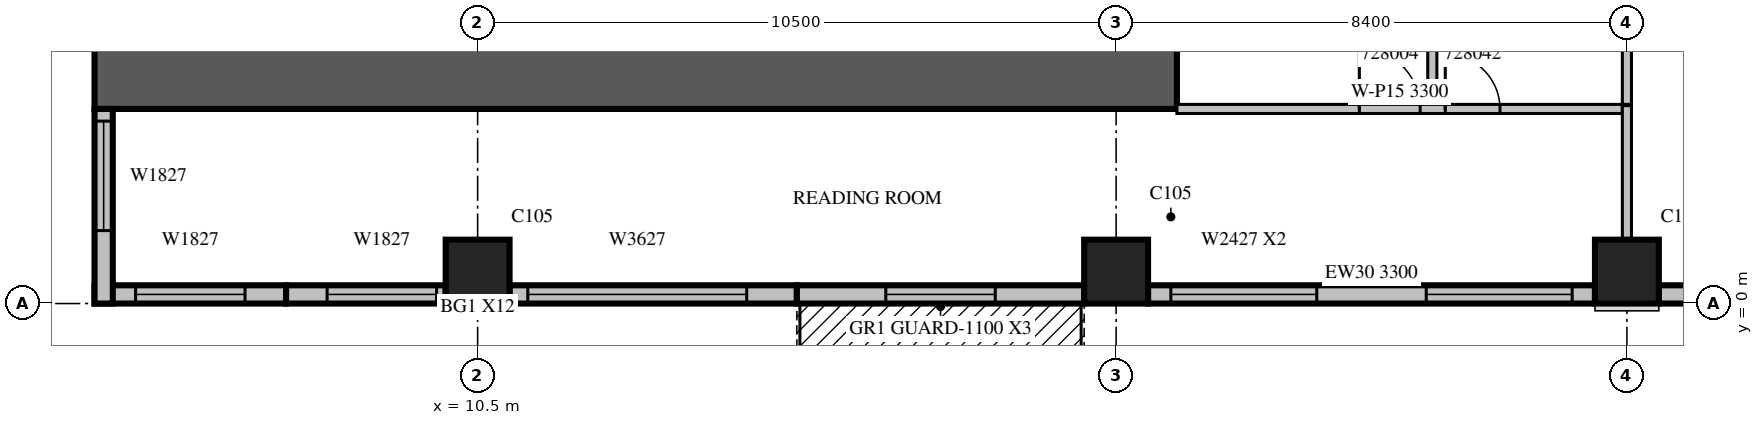
"""IFC4 building model, lengths in metres.
Left out: names, types, materials, properties, quantities, classifications, styles, units other than length and angle.
Written with IfcOpenShell. Run it as: python <this file> out.ifc"""

import sys

from ifc_helpers import new_model, si_unit, direction, frame, frame_2d, origin, origin_2d, place, context, subcontext, project, spatial, rectangle, extrude, source, transform, mapped, element, fill, save


model = new_model("IFC4")
c1 = context("Model", 3, precision=1e-05, world=origin(), true_north=direction((0.0, 1.0)))
c2 = subcontext(c1, "Body", "Model", "MODEL_VIEW")
j1 = project(units=[si_unit("LENGTHUNIT", "METRE"), si_unit("PLANEANGLEUNIT", "RADIAN")], contexts=[c1])
p1 = place(None, origin())
s1 = spatial("IfcSite", under=j1, at=p1, CompositionType="ELEMENT")
p2 = place(p1, origin())
s2 = spatial("IfcBuilding", under=s1, at=p2, CompositionType="ELEMENT")
p3 = place(p2, frame((0.0, 0.0, 128.7)))
s3 = spatial("IfcBuildingStorey", under=s2, at=p3, CompositionType="ELEMENT", Elevation=128.7)
m1 = source(origin(), c2, "Body", "SweptSolid", [
    extrude(rectangle(XDim=1.05, YDim=1.05, at=origin_2d()), origin(), (0.0, 0.0, 1.0), 4.2),
])
for number, where, z_axis, x_axis in (
    (1, (10.5, 0.525, 0.0), (0.0, 0.0, 1.0), (1.0, 0.0, 0.0)),
    (2, (21.0, 0.525, 0.0), (0.0, 0.0, 1.0), (1.0, 0.0, 0.0)),
    (3, (29.4, 0.525, 0.0), (0.0, 0.0, 1.0), (1.0, 0.0, 0.0)),
):
    element("IfcColumn", number, at=place(p3, frame(where, z_axis=z_axis, x_axis=x_axis)), inside=s3, PredefinedType="COLUMN", context=c2, shape_type="MappedRepresentation", body=[
        mapped(m1, transform((0.0, 0.0, 0.0), scale=1.0)),
    ])
m2 = source(origin(), c2, "Body", "SweptSolid", [
    extrude(rectangle(XDim=17.8, YDim=1.0, at=frame_2d((8.9, 0.0))), origin(), (0.0, 0.0, 1.0), 4.2),
])
p4 = place(p3, frame((4.2, 3.7, 0.0), z_axis=(0.0, 0.0, 1.0), x_axis=(1.0, 0.0, 0.0)))
e4 = element("IfcWall", 4, at=p4, inside=s3, PredefinedType="SHEAR", context=c2, shape_type="MappedRepresentation", body=[
    mapped(m2, transform((0.0, 0.0, 0.0), scale=1.0)),
])
m3 = source(origin(), c2, "Body", "SweptSolid", [
    extrude(rectangle(XDim=3.15, YDim=0.3, at=frame_2d((1.575, 0.0))), origin(), (0.0, 0.0, 1.0), 3.8),
])
p5 = place(p3, frame((4.2, 0.15, 0.0), z_axis=(0.0, 0.0, 1.0), x_axis=(1.0, 0.0, 0.0)))
e5 = element("IfcWall", 5, at=p5, inside=s3, PredefinedType="STANDARD", context=c2, shape_type="MappedRepresentation", body=[
    mapped(m3, transform((0.0, 0.0, 0.0), scale=1.0)),
])
m4 = source(origin(), c2, "Body", "SweptSolid", [
    extrude(rectangle(XDim=1.8, YDim=2.7, at=frame_2d((0.9, 1.35))), frame((0.0, 0.16, 0.0), z_axis=(0.0, -1.0, 0.0), x_axis=(1.0, 0.0, 0.0)), (0.0, 0.0, 1.0), 0.32),
])
p6 = place(p5, frame((0.675, 0.0, 0.6)))
e6 = element("IfcOpeningElement", 6, at=p6, cuts=e5, PredefinedType="OPENING", context=c2, shape_type="MappedRepresentation", body=[
    mapped(m4, transform((0.0, 0.0, 0.0), scale=1.0)),
])
m5 = source(origin(), c2, "Body", "SweptSolid", [
    extrude(rectangle(XDim=2.625, YDim=0.3, at=frame_2d((1.312, 0.0))), origin(), (0.0, 0.0, 1.0), 3.8),
])
p7 = place(p3, frame((7.35, 0.15, 0.0), z_axis=(0.0, 0.0, 1.0), x_axis=(1.0, 0.0, 0.0)))
e7 = element("IfcWall", 7, at=p7, inside=s3, PredefinedType="STANDARD", context=c2, shape_type="MappedRepresentation", body=[
    mapped(m5, transform((0.0, 0.0, 0.0), scale=1.0)),
])
p8 = place(p7, frame((0.675, 0.0, 0.6)))
e8 = element("IfcOpeningElement", 8, at=p8, cuts=e7, PredefinedType="OPENING", context=c2, shape_type="MappedRepresentation", body=[
    mapped(m4, transform((0.0, 0.0, 0.0), scale=1.0)),
])
m6 = source(origin(), c2, "Body", "SweptSolid", [
    extrude(rectangle(XDim=4.725, YDim=0.3, at=frame_2d((2.362, 0.0))), origin(), (0.0, 0.0, 1.0), 3.8),
])
p9 = place(p3, frame((11.025, 0.15, 0.0), z_axis=(0.0, 0.0, 1.0), x_axis=(1.0, 0.0, 0.0)))
e9 = element("IfcWall", 9, at=p9, inside=s3, PredefinedType="STANDARD", context=c2, shape_type="MappedRepresentation", body=[
    mapped(m6, transform((0.0, 0.0, 0.0), scale=1.0)),
])
m7 = source(origin(), c2, "Body", "SweptSolid", [
    extrude(rectangle(XDim=3.6, YDim=2.7, at=frame_2d((1.8, 1.35))), frame((0.0, 0.16, 0.0), z_axis=(0.0, -1.0, 0.0), x_axis=(1.0, 0.0, 0.0)), (0.0, 0.0, 1.0), 0.32),
])
p10 = place(p9, frame((0.3, 0.0, 0.6)))
e10 = element("IfcOpeningElement", 10, at=p10, cuts=e9, PredefinedType="OPENING", context=c2, shape_type="MappedRepresentation", body=[
    mapped(m7, transform((0.0, 0.0, 0.0), scale=1.0)),
])
p11 = place(p3, frame((15.75, 0.15, 0.0), z_axis=(0.0, 0.0, 1.0), x_axis=(1.0, 0.0, 0.0)))
e11 = element("IfcWall", 11, at=p11, inside=s3, PredefinedType="STANDARD", context=c2, shape_type="MappedRepresentation", body=[
    mapped(m6, transform((0.0, 0.0, 0.0), scale=1.0)),
])
m8 = source(origin(), c2, "Body", "SweptSolid", [
    extrude(rectangle(XDim=1.8, YDim=2.4, at=frame_2d((0.9, 1.2))), frame((0.0, 0.16, 0.0), z_axis=(0.0, -1.0, 0.0), x_axis=(1.0, 0.0, 0.0)), (0.0, 0.0, 1.0), 0.32),
])
p12 = place(p11, frame((1.462, 0.0, 0.0)))
e12 = element("IfcOpeningElement", 12, at=p12, cuts=e11, PredefinedType="OPENING", context=c2, shape_type="MappedRepresentation", body=[
    mapped(m8, transform((0.0, 0.0, 0.0), scale=1.0)),
])
m9 = source(origin(), c2, "Body", "SweptSolid", [
    extrude(rectangle(XDim=7.35, YDim=0.3, at=frame_2d((3.675, 0.0))), origin(), (0.0, 0.0, 1.0), 3.3),
])
p13 = place(p3, frame((21.525, 0.15, 0.0), z_axis=(0.0, 0.0, 1.0), x_axis=(1.0, 0.0, 0.0)))
e13 = element("IfcWall", 13, at=p13, inside=s3, PredefinedType="STANDARD", context=c2, shape_type="MappedRepresentation", body=[
    mapped(m9, transform((0.0, 0.0, 0.0), scale=1.0)),
])
m10 = source(origin(), c2, "Body", "SweptSolid", [
    extrude(rectangle(XDim=2.4, YDim=2.7, at=frame_2d((1.2, 1.35))), frame((0.0, 0.16, 0.0), z_axis=(0.0, -1.0, 0.0), x_axis=(1.0, 0.0, 0.0)), (0.0, 0.0, 1.0), 0.32),
])
p14 = place(p13, frame((0.375, 0.0, 0.6)))
e14 = element("IfcOpeningElement", 14, at=p14, cuts=e13, PredefinedType="OPENING", context=c2, shape_type="MappedRepresentation", body=[
    mapped(m10, transform((0.0, 0.0, 0.0), scale=1.0)),
])
p15 = place(p13, frame((4.575, 0.0, 0.6)))
e15 = element("IfcOpeningElement", 15, at=p15, cuts=e13, PredefinedType="OPENING", context=c2, shape_type="MappedRepresentation", body=[
    mapped(m10, transform((0.0, 0.0, 0.0), scale=1.0)),
])
m11 = source(origin(), c2, "Body", "SweptSolid", [
    extrude(rectangle(XDim=7.35, YDim=0.3, at=frame_2d((3.675, 0.0))), origin(), (0.0, 0.0, 1.0), 3.8),
])
p16 = place(p3, frame((29.925, 0.15, 0.0), z_axis=(0.0, 0.0, 1.0), x_axis=(1.0, 0.0, 0.0)))
e16 = element("IfcWall", 16, at=p16, inside=s3, PredefinedType="STANDARD", context=c2, shape_type="MappedRepresentation", body=[
    mapped(m11, transform((0.0, 0.0, 0.0), scale=1.0)),
])
p17 = place(p16, frame((2.575, 0.0, 0.6)))
e17 = element("IfcOpeningElement", 17, at=p17, cuts=e16, PredefinedType="OPENING", context=c2, shape_type="MappedRepresentation", body=[
    mapped(m10, transform((0.0, 0.0, 0.0), scale=1.0)),
])
m12 = source(origin(), c2, "Body", "SweptSolid", [
    extrude(rectangle(XDim=3.2, YDim=0.3, at=frame_2d((1.6, 0.0))), origin(), (0.0, 0.0, 1.0), 3.8),
])
p18 = place(p3, frame((4.35, 3.2, 0.0), z_axis=(0.0, 0.0, 1.0), x_axis=(0.0, -1.0, 0.0)))
e18 = element("IfcWall", 18, at=p18, inside=s3, PredefinedType="STANDARD", context=c2, shape_type="MappedRepresentation", body=[
    mapped(m12, transform((0.0, 0.0, 0.0), scale=1.0)),
])
p19 = place(p18, frame((0.2, 0.0, 0.6)))
e19 = element("IfcOpeningElement", 19, at=p19, cuts=e18, PredefinedType="OPENING", context=c2, shape_type="MappedRepresentation", body=[
    mapped(m4, transform((0.0, 0.0, 0.0), scale=1.0)),
])
p20 = place(p3, frame((26.2, 15.0, 0.0), z_axis=(0.0, 0.0, 1.0), x_axis=(0.0, -1.0, 0.0)))
e20 = element("IfcWall", 20, at=p20, inside=s3, PredefinedType="PARTITIONING", context=c2, shape_type="SweptSolid", body=[
    extrude(rectangle(XDim=11.725, YDim=0.15, at=frame_2d((5.862, 0.0))), origin(), (0.0, 0.0, 1.0), 2.8),
])
m13 = source(origin(), c2, "Body", "SweptSolid", [
    extrude(rectangle(XDim=0.9, YDim=2.1, at=frame_2d((0.45, 1.05))), frame((0.0, 0.085, 0.0), z_axis=(0.0, -1.0, 0.0), x_axis=(1.0, 0.0, 0.0)), (0.0, 0.0, 1.0), 0.17),
])
p21 = place(p20, frame((9.463, 0.0, 0.0)))
e21 = element("IfcOpeningElement", 21, at=p21, cuts=e20, PredefinedType="OPENING", context=c2, shape_type="MappedRepresentation", body=[
    mapped(m13, transform((0.0, 0.0, 0.0), scale=1.0)),
])
p22 = place(p20, frame((2.725, 0.0, 0.0)))
e22 = element("IfcOpeningElement", 22, at=p22, cuts=e20, PredefinedType="OPENING", context=c2, shape_type="MappedRepresentation", body=[
    mapped(m13, transform((0.0, 0.0, 0.0), scale=1.0)),
])
m14 = source(origin(), c2, "Body", "SweptSolid", [
    extrude(rectangle(XDim=6.701, YDim=0.15, at=frame_2d((3.35, 0.0))), origin(), (0.0, 0.0, 1.0), 3.8),
])
p23 = place(p3, frame((29.4, 3.275, 0.0), z_axis=(0.0, 0.0, 1.0), x_axis=(0.0, 1.0, 0.0)))
e23 = element("IfcWall", 23, at=p23, inside=s3, PredefinedType="PARTITIONING", context=c2, shape_type="MappedRepresentation", body=[
    mapped(m14, transform((0.0, 0.0, 0.0), scale=1.0)),
])
m15 = source(origin(), c2, "Body", "SweptSolid", [
    extrude(rectangle(XDim=7.325, YDim=0.15, at=frame_2d((3.663, 0.0))), origin(), (0.0, 0.0, 1.0), 3.3),
])
p24 = place(p3, frame((22.0, 3.2, 0.0), z_axis=(0.0, 0.0, 1.0), x_axis=(1.0, 0.0, 0.0)))
e24 = element("IfcWall", 24, at=p24, inside=s3, PredefinedType="PARTITIONING", context=c2, shape_type="MappedRepresentation", body=[
    mapped(m15, transform((0.0, 0.0, 0.0), scale=1.0)),
])
m16 = source(origin(), c2, "Body", "SweptSolid", [
    extrude(rectangle(XDim=1.0, YDim=2.1, at=frame_2d((0.5, 1.05))), frame((0.0, 0.085, 0.0), z_axis=(0.0, -1.0, 0.0), x_axis=(1.0, 0.0, 0.0)), (0.0, 0.0, 1.0), 0.17),
])
p25 = place(p24, frame((3.0, 0.0, 0.0)))
e25 = element("IfcOpeningElement", 25, at=p25, cuts=e24, PredefinedType="OPENING", context=c2, shape_type="MappedRepresentation", body=[
    mapped(m16, transform((0.0, 0.0, 0.0), scale=1.0)),
])
p26 = place(p24, frame((4.413, 0.0, 0.0)))
e26 = element("IfcOpeningElement", 26, at=p26, cuts=e24, PredefinedType="OPENING", context=c2, shape_type="MappedRepresentation", body=[
    mapped(m13, transform((0.0, 0.0, 0.0), scale=1.0)),
])
m17 = source(origin(), c2, "Body", "SweptSolid", [
    extrude(rectangle(XDim=2.206, YDim=0.15, at=frame_2d((1.103, 0.0))), origin(), (0.0, 0.0, 1.0), 3.8),
])
p27 = place(p3, frame((29.4, 1.049, 0.0), z_axis=(0.0, 0.0, 1.0), x_axis=(0.0, 1.0, 0.0)))
e27 = element("IfcWall", 27, at=p27, inside=s3, PredefinedType="PARTITIONING", context=c2, shape_type="MappedRepresentation", body=[
    mapped(m17, transform((0.0, 0.0, 0.0), scale=1.0)),
])
m18 = source(origin(), c2, "Body", "SweptSolid", [
    extrude(rectangle(XDim=1.8, YDim=2.7, at=frame_2d((0.9, 1.35))), frame((0.0, 0.03, 0.0), z_axis=(0.0, -1.0, 0.0), x_axis=(1.0, 0.0, 0.0)), (0.0, 0.0, 1.0), 0.06),
])
p28 = place(p6, origin())
e28 = element("IfcWindow", 28, at=p28, inside=s3, PartitioningType="SINGLE_PANEL", PredefinedType="WINDOW", context=c2, shape_type="MappedRepresentation", body=[
    mapped(m18, transform((0.0, 0.0, 0.0), scale=1.0)),
])
fill(e6, e28)
p29 = place(p8, origin())
e29 = element("IfcWindow", 29, at=p29, inside=s3, PartitioningType="SINGLE_PANEL", PredefinedType="WINDOW", context=c2, shape_type="MappedRepresentation", body=[
    mapped(m18, transform((0.0, 0.0, 0.0), scale=1.0)),
])
fill(e8, e29)
m19 = source(origin(), c2, "Body", "SweptSolid", [
    extrude(rectangle(XDim=3.6, YDim=2.7, at=frame_2d((1.8, 1.35))), frame((0.0, 0.03, 0.0), z_axis=(0.0, -1.0, 0.0), x_axis=(1.0, 0.0, 0.0)), (0.0, 0.0, 1.0), 0.06),
])
p30 = place(p10, origin())
e30 = element("IfcWindow", 30, at=p30, inside=s3, PartitioningType="SINGLE_PANEL", PredefinedType="WINDOW", context=c2, shape_type="MappedRepresentation", body=[
    mapped(m19, transform((0.0, 0.0, 0.0), scale=1.0)),
])
fill(e10, e30)
m20 = source(origin(), c2, "Body", "SweptSolid", [
    extrude(rectangle(XDim=1.8, YDim=2.4, at=frame_2d((0.9, 1.2))), frame((0.0, 0.025, 0.0), z_axis=(0.0, -1.0, 0.0), x_axis=(1.0, 0.0, 0.0)), (0.0, 0.0, 1.0), 0.05),
])
p31 = place(p12, origin())
e31 = element("IfcDoor", 31, at=p31, inside=s3, OperationType="SLIDING_TO_LEFT", PredefinedType="DOOR", context=c2, shape_type="MappedRepresentation", body=[
    mapped(m20, transform((0.0, 0.0, 0.0), scale=1.0)),
])
fill(e12, e31)
m21 = source(origin(), c2, "Body", "SweptSolid", [
    extrude(rectangle(XDim=2.4, YDim=2.7, at=frame_2d((1.2, 1.35))), frame((0.0, 0.03, 0.0), z_axis=(0.0, -1.0, 0.0), x_axis=(1.0, 0.0, 0.0)), (0.0, 0.0, 1.0), 0.06),
])
p32 = place(p14, origin())
e32 = element("IfcWindow", 32, at=p32, inside=s3, PartitioningType="SINGLE_PANEL", PredefinedType="WINDOW", context=c2, shape_type="MappedRepresentation", body=[
    mapped(m21, transform((0.0, 0.0, 0.0), scale=1.0)),
])
fill(e14, e32)
p33 = place(p15, origin())
e33 = element("IfcWindow", 33, at=p33, inside=s3, PartitioningType="SINGLE_PANEL", PredefinedType="WINDOW", context=c2, shape_type="MappedRepresentation", body=[
    mapped(m21, transform((0.0, 0.0, 0.0), scale=1.0)),
])
fill(e15, e33)
p34 = place(p19, origin())
e34 = element("IfcWindow", 34, at=p34, inside=s3, PartitioningType="SINGLE_PANEL", PredefinedType="WINDOW", context=c2, shape_type="MappedRepresentation", body=[
    mapped(m18, transform((0.0, 0.0, 0.0), scale=1.0)),
])
fill(e19, e34)
m22 = source(origin(), c2, "Body", "SweptSolid", [
    extrude(rectangle(XDim=1.0, YDim=2.1, at=frame_2d((0.5, 1.05))), frame((0.0, 0.025, 0.0), z_axis=(0.0, -1.0, 0.0), x_axis=(1.0, 0.0, 0.0)), (0.0, 0.0, 1.0), 0.05),
])
p35 = place(p25, origin())
e35 = element("IfcDoor", 35, at=p35, inside=s3, OperationType="SINGLE_SWING_LEFT", PredefinedType="DOOR", context=c2, shape_type="MappedRepresentation", body=[
    mapped(m22, transform((0.0, 0.0, 0.0), scale=1.0)),
])
fill(e25, e35)
m23 = source(origin(), c2, "Body", "SweptSolid", [
    extrude(rectangle(XDim=0.9, YDim=2.1, at=frame_2d((0.45, 1.05))), frame((0.0, 0.025, 0.0), z_axis=(0.0, -1.0, 0.0), x_axis=(1.0, 0.0, 0.0)), (0.0, 0.0, 1.0), 0.05),
])
p36 = place(p26, origin())
e36 = element("IfcDoor", 36, at=p36, inside=s3, OperationType="SINGLE_SWING_LEFT", PredefinedType="DOOR", context=c2, shape_type="MappedRepresentation", body=[
    mapped(m23, transform((0.0, 0.0, 0.0), scale=1.0)),
])
fill(e26, e36)
save(model, sys.argv[1])
